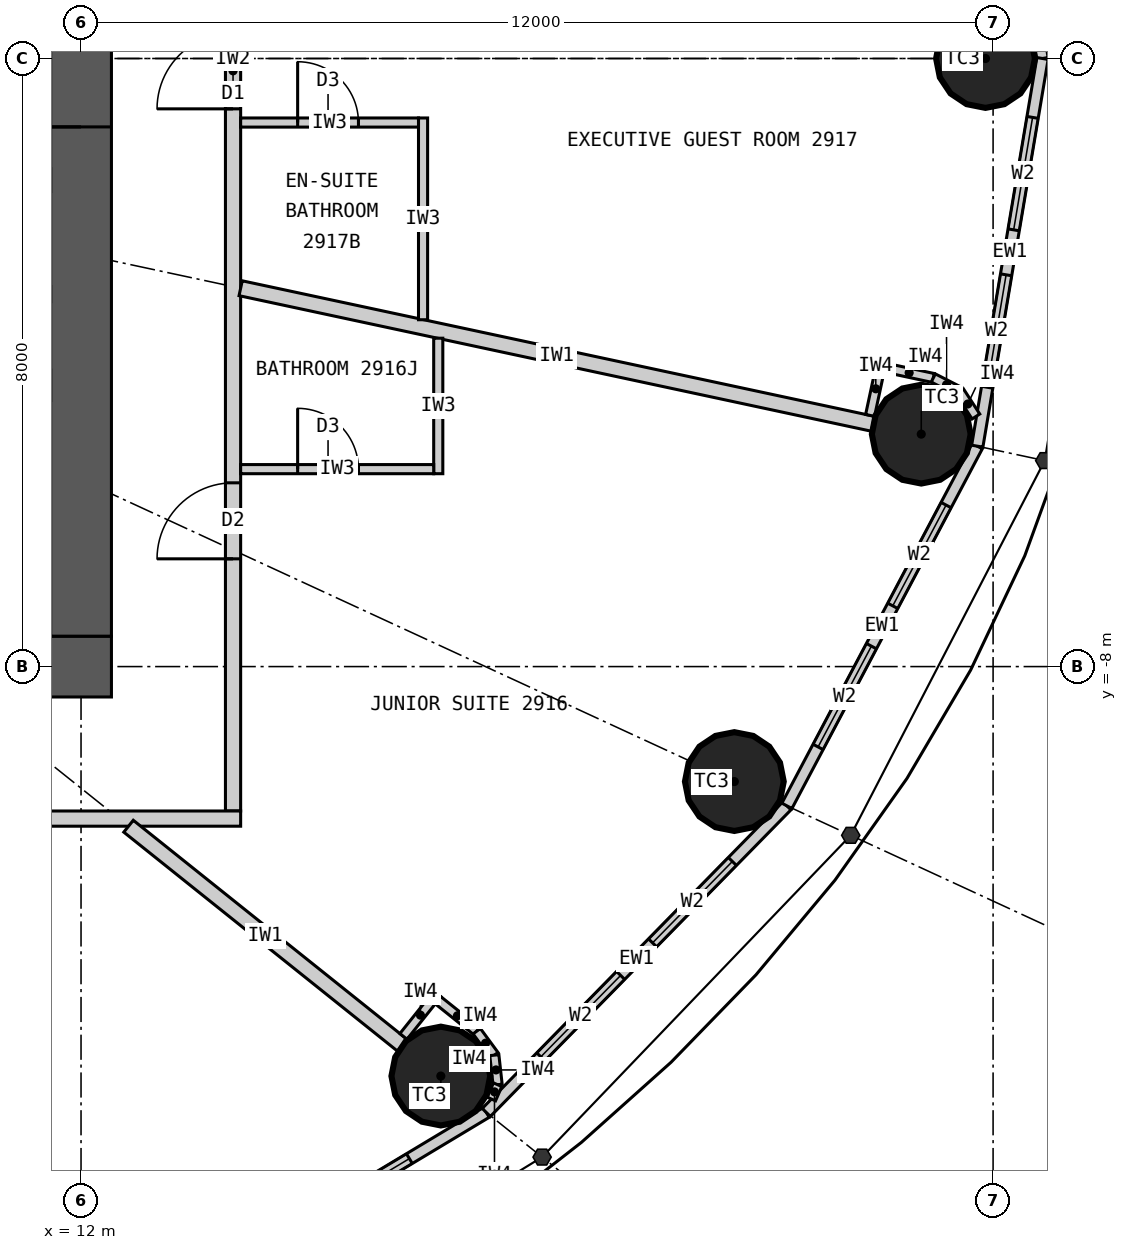
"""IFC4 building model, lengths in metres.
Left out: names, types, materials, properties, quantities, classifications, styles, units other than length and angle.
Written with IfcOpenShell. Run it as: python <this file> out.ifc"""

import sys

from ifc_helpers import new_model, si_unit, direction, frame, frame_2d, origin, origin_2d, place, context, subcontext, project, spatial, rectangle, circle, extrude, element, fill, save


model = new_model("IFC4")
c1 = context("Model", 3, precision=1e-05, world=origin(), true_north=direction((0.0, 1.0)))
c2 = subcontext(c1, "Body", "Model", "MODEL_VIEW")
j1 = project(units=[si_unit("LENGTHUNIT", "METRE"), si_unit("PLANEANGLEUNIT", "RADIAN")], contexts=[c1])
p1 = place(None, origin())
s1 = spatial("IfcSite", under=j1, at=p1, CompositionType="ELEMENT")
p2 = place(p1, origin())
s2 = spatial("IfcBuilding", under=s1, at=p2, CompositionType="ELEMENT")
p3 = place(p2, frame((0.0, 0.0, 115.5)))
s3 = spatial("IfcBuildingStorey", under=s2, at=p3, CompositionType="ELEMENT", Elevation=115.5)
for number, where, z_axis, x_axis in (
    (1, (23.9, 0.0, 0.0), (0.0, 0.0, 1.0), (1.0, 0.0, 0.0)),
    (2, (16.734, -13.387, 0.0), (0.0, 0.0, 1.0), (1.0, 0.0, 0.0)),
    (3, (20.596, -9.513, 0.0), (0.0, 0.0, 1.0), (1.0, 0.0, 0.0)),
    (4, (23.055, -4.942, 0.0), (0.0, 0.0, 1.0), (1.0, 0.0, 0.0)),
):
    element("IfcColumn", number, at=place(p3, frame(where, z_axis=z_axis, x_axis=x_axis)), inside=s3, PredefinedType="COLUMN", context=c2, shape_type="SweptSolid", body=[
        extrude(circle(Radius=0.65, at=origin_2d()), origin(), (0.0, 0.0, 1.0), 3.3),
    ])
p4 = place(p3, frame((12.4, -8.0, 0.0), z_axis=(0.0, 0.0, 1.0), x_axis=(-1.0, 0.0, 0.0)))
e5 = element("IfcWall", 5, at=p4, inside=s3, PredefinedType="SHEAR", context=c2, shape_type="SweptSolid", body=[
    extrude(rectangle(XDim=24.8, YDim=0.8, at=frame_2d((12.4, 0.0))), origin(), (0.0, 0.0, 1.0), 3.3),
])
p5 = place(p4, frame((11.1, 0.0, 0.0)))
e6 = element("IfcOpeningElement", 6, at=p5, cuts=e5, PredefinedType="OPENING", context=c2, shape_type="SweptSolid", body=[
    extrude(rectangle(XDim=1.2, YDim=2.2, at=frame_2d((0.6, 1.1))), frame((0.0, 0.41, 0.0), z_axis=(0.0, -1.0, 0.0), x_axis=(1.0, 0.0, 0.0)), (0.0, 0.0, 1.0), 0.82),
])
p6 = place(p4, frame((18.7, 0.0, 0.0)))
e7 = element("IfcOpeningElement", 7, at=p6, cuts=e5, PredefinedType="OPENING", context=c2, shape_type="SweptSolid", body=[
    extrude(rectangle(XDim=0.9, YDim=2.2, at=frame_2d((0.45, 1.1))), frame((0.0, 0.41, 0.0), z_axis=(0.0, -1.0, 0.0), x_axis=(1.0, 0.0, 0.0)), (0.0, 0.0, 1.0), 0.82),
])
p7 = place(p3, frame((12.0, -7.6, 0.0), z_axis=(0.0, 0.0, 1.0), x_axis=(0.0, 1.0, 0.0)))
e8 = element("IfcWall", 8, at=p7, inside=s3, PredefinedType="SHEAR", context=c2, shape_type="SweptSolid", body=[
    extrude(rectangle(XDim=15.2, YDim=0.8, at=frame_2d((7.6, 0.0))), origin(), (0.0, 0.0, 1.0), 3.3),
])
p8 = place(p7, frame((6.7, 0.0, 0.0)))
e9 = element("IfcOpeningElement", 9, at=p8, cuts=e8, PredefinedType="OPENING", context=c2, shape_type="SweptSolid", body=[
    extrude(rectangle(XDim=1.8, YDim=2.2, at=frame_2d((0.9, 1.1))), frame((0.0, 0.41, 0.0), z_axis=(0.0, -1.0, 0.0), x_axis=(1.0, 0.0, 0.0)), (0.0, 0.0, 1.0), 0.82),
])
p9 = place(p3, frame((24.65, 0.0, 0.0), z_axis=(0.0, 0.0, 1.0), x_axis=(-0.165883894218, 0.986145290329, 0.0)))
e10 = element("IfcWall", 10, at=p9, inside=s3, PredefinedType="ELEMENTEDWALL", context=c2, shape_type="SweptSolid", body=[
    extrude(rectangle(XDim=5.172, YDim=0.15, at=frame_2d((2.586, 0.0))), origin(), (0.0, 0.0, 1.0), 3.12),
])
p10 = place(p9, frame((0.786, 0.0, 0.9)))
e11 = element("IfcOpeningElement", 11, at=p10, cuts=e10, PredefinedType="OPENING", context=c2, shape_type="SweptSolid", body=[
    extrude(rectangle(XDim=1.5, YDim=1.9, at=frame_2d((0.75, 0.95))), frame((0.0, 0.085, 0.0), z_axis=(0.0, -1.0, 0.0), x_axis=(1.0, 0.0, 0.0)), (0.0, 0.0, 1.0), 0.17),
])
p11 = place(p9, frame((2.886, 0.0, 0.9)))
e12 = element("IfcOpeningElement", 12, at=p11, cuts=e10, PredefinedType="OPENING", context=c2, shape_type="SweptSolid", body=[
    extrude(rectangle(XDim=1.5, YDim=1.9, at=frame_2d((0.75, 0.95))), frame((0.0, 0.085, 0.0), z_axis=(0.0, -1.0, 0.0), x_axis=(1.0, 0.0, 0.0)), (0.0, 0.0, 1.0), 0.17),
])
p12 = place(p3, frame((12.221, -16.935, 0.0), z_axis=(0.0, 0.0, 1.0), x_axis=(0.857308573723, 0.514802884044, 0.0)))
e13 = element("IfcWall", 13, at=p12, inside=s3, PredefinedType="ELEMENTEDWALL", context=c2, shape_type="SweptSolid", body=[
    extrude(rectangle(XDim=5.961, YDim=0.15, at=frame_2d((2.98, 0.0))), origin(), (0.0, 0.0, 1.0), 3.12),
])
p13 = place(p12, frame((1.181, 0.0, 0.9)))
e14 = element("IfcOpeningElement", 14, at=p13, cuts=e13, PredefinedType="OPENING", context=c2, shape_type="SweptSolid", body=[
    extrude(rectangle(XDim=1.5, YDim=1.9, at=frame_2d((0.75, 0.95))), frame((0.0, 0.085, 0.0), z_axis=(0.0, -1.0, 0.0), x_axis=(1.0, 0.0, 0.0)), (0.0, 0.0, 1.0), 0.17),
])
p14 = place(p12, frame((3.281, 0.0, 0.9)))
e15 = element("IfcOpeningElement", 15, at=p14, cuts=e13, PredefinedType="OPENING", context=c2, shape_type="SweptSolid", body=[
    extrude(rectangle(XDim=1.5, YDim=1.9, at=frame_2d((0.75, 0.95))), frame((0.0, 0.085, 0.0), z_axis=(0.0, -1.0, 0.0), x_axis=(1.0, 0.0, 0.0)), (0.0, 0.0, 1.0), 0.17),
])
p15 = place(p3, frame((17.332, -13.866, 0.0), z_axis=(0.0, 0.0, 1.0), x_axis=(0.700136650834, 0.714008872605, 0.0)))
e16 = element("IfcWall", 16, at=p15, inside=s3, PredefinedType="ELEMENTEDWALL", context=c2, shape_type="SweptSolid", body=[
    extrude(rectangle(XDim=5.649, YDim=0.15, at=frame_2d((2.825, 0.0))), origin(), (0.0, 0.0, 1.0), 3.12),
])
p16 = place(p15, frame((1.025, 0.0, 0.9)))
e17 = element("IfcOpeningElement", 17, at=p16, cuts=e16, PredefinedType="OPENING", context=c2, shape_type="SweptSolid", body=[
    extrude(rectangle(XDim=1.5, YDim=1.9, at=frame_2d((0.75, 0.95))), frame((0.0, 0.085, 0.0), z_axis=(0.0, -1.0, 0.0), x_axis=(1.0, 0.0, 0.0)), (0.0, 0.0, 1.0), 0.17),
])
p17 = place(p15, frame((3.125, 0.0, 0.9)))
e18 = element("IfcOpeningElement", 18, at=p17, cuts=e16, PredefinedType="OPENING", context=c2, shape_type="SweptSolid", body=[
    extrude(rectangle(XDim=1.5, YDim=1.9, at=frame_2d((0.75, 0.95))), frame((0.0, 0.085, 0.0), z_axis=(0.0, -1.0, 0.0), x_axis=(1.0, 0.0, 0.0)), (0.0, 0.0, 1.0), 0.17),
])
p18 = place(p3, frame((21.287, -9.832, 0.0), z_axis=(0.0, 0.0, 1.0), x_axis=(0.467814388454, 0.883826735257, 0.0)))
e19 = element("IfcWall", 19, at=p18, inside=s3, PredefinedType="ELEMENTEDWALL", context=c2, shape_type="SweptSolid", body=[
    extrude(rectangle(XDim=5.354, YDim=0.15, at=frame_2d((2.677, 0.0))), origin(), (0.0, 0.0, 1.0), 3.12),
])
p19 = place(p18, frame((0.877, 0.0, 0.9)))
e20 = element("IfcOpeningElement", 20, at=p19, cuts=e19, PredefinedType="OPENING", context=c2, shape_type="SweptSolid", body=[
    extrude(rectangle(XDim=1.5, YDim=1.9, at=frame_2d((0.75, 0.95))), frame((0.0, 0.085, 0.0), z_axis=(0.0, -1.0, 0.0), x_axis=(1.0, 0.0, 0.0)), (0.0, 0.0, 1.0), 0.17),
])
p20 = place(p18, frame((2.977, 0.0, 0.9)))
e21 = element("IfcOpeningElement", 21, at=p20, cuts=e19, PredefinedType="OPENING", context=c2, shape_type="SweptSolid", body=[
    extrude(rectangle(XDim=1.5, YDim=1.9, at=frame_2d((0.75, 0.95))), frame((0.0, 0.085, 0.0), z_axis=(0.0, -1.0, 0.0), x_axis=(1.0, 0.0, 0.0)), (0.0, 0.0, 1.0), 0.17),
])
p21 = place(p3, frame((23.792, -5.1, 0.0), z_axis=(0.0, 0.0, 1.0), x_axis=(0.165883894218, 0.986145290329, 0.0)))
e22 = element("IfcWall", 22, at=p21, inside=s3, PredefinedType="ELEMENTEDWALL", context=c2, shape_type="SweptSolid", body=[
    extrude(rectangle(XDim=5.172, YDim=0.15, at=frame_2d((2.586, 0.0))), origin(), (0.0, 0.0, 1.0), 3.12),
])
p22 = place(p21, frame((0.786, 0.0, 0.9)))
e23 = element("IfcOpeningElement", 23, at=p22, cuts=e22, PredefinedType="OPENING", context=c2, shape_type="SweptSolid", body=[
    extrude(rectangle(XDim=1.5, YDim=1.9, at=frame_2d((0.75, 0.95))), frame((0.0, 0.085, 0.0), z_axis=(0.0, -1.0, 0.0), x_axis=(1.0, 0.0, 0.0)), (0.0, 0.0, 1.0), 0.17),
])
p23 = place(p21, frame((2.886, 0.0, 0.9)))
e24 = element("IfcOpeningElement", 24, at=p23, cuts=e22, PredefinedType="OPENING", context=c2, shape_type="SweptSolid", body=[
    extrude(rectangle(XDim=1.5, YDim=1.9, at=frame_2d((0.75, 0.95))), frame((0.0, 0.085, 0.0), z_axis=(0.0, -1.0, 0.0), x_axis=(1.0, 0.0, 0.0)), (0.0, 0.0, 1.0), 0.17),
])
p24 = place(p3, frame((14.0, -9.9, 0.0), z_axis=(0.0, 0.0, 1.0), x_axis=(0.0, 1.0, 0.0)))
e25 = element("IfcWall", 25, at=p24, inside=s3, PredefinedType="PARTITIONING", context=c2, shape_type="SweptSolid", body=[
    extrude(rectangle(XDim=19.8, YDim=0.2, at=frame_2d((9.9, 0.0))), origin(), (0.0, 0.0, 1.0), 3.12),
])
p25 = place(p24, frame((3.318, 0.0, 0.0)))
e26 = element("IfcOpeningElement", 26, at=p25, cuts=e25, PredefinedType="OPENING", context=c2, shape_type="SweptSolid", body=[
    extrude(rectangle(XDim=1.0, YDim=2.2, at=frame_2d((0.5, 1.1))), frame((0.0, 0.11, 0.0), z_axis=(0.0, -1.0, 0.0), x_axis=(1.0, 0.0, 0.0)), (0.0, 0.0, 1.0), 0.22),
])
p26 = place(p24, frame((9.238, 0.0, 0.0)))
e27 = element("IfcOpeningElement", 27, at=p26, cuts=e25, PredefinedType="OPENING", context=c2, shape_type="SweptSolid", body=[
    extrude(rectangle(XDim=1.0, YDim=2.2, at=frame_2d((0.5, 1.1))), frame((0.0, 0.11, 0.0), z_axis=(0.0, -1.0, 0.0), x_axis=(1.0, 0.0, 0.0)), (0.0, 0.0, 1.0), 0.22),
])
p27 = place(p24, frame((13.742, 0.0, 0.0)))
e28 = element("IfcOpeningElement", 28, at=p27, cuts=e25, PredefinedType="OPENING", context=c2, shape_type="SweptSolid", body=[
    extrude(rectangle(XDim=1.0, YDim=2.2, at=frame_2d((0.5, 1.1))), frame((0.0, 0.11, 0.0), z_axis=(0.0, -1.0, 0.0), x_axis=(1.0, 0.0, 0.0)), (0.0, 0.0, 1.0), 0.22),
])
p28 = place(p24, frame((18.698, 0.0, 0.0)))
e29 = element("IfcOpeningElement", 29, at=p28, cuts=e25, PredefinedType="OPENING", context=c2, shape_type="SweptSolid", body=[
    extrude(rectangle(XDim=1.0, YDim=2.2, at=frame_2d((0.5, 1.1))), frame((0.0, 0.11, 0.0), z_axis=(0.0, -1.0, 0.0), x_axis=(1.0, 0.0, 0.0)), (0.0, 0.0, 1.0), 0.22),
])
p29 = place(p3, frame((14.1, -10.0, 0.0), z_axis=(0.0, 0.0, 1.0), x_axis=(-1.0, 0.0, 0.0)))
e30 = element("IfcWall", 30, at=p29, inside=s3, PredefinedType="PARTITIONING", context=c2, shape_type="SweptSolid", body=[
    extrude(rectangle(XDim=10.817, YDim=0.2, at=frame_2d((5.409, 0.0))), origin(), (0.0, 0.0, 1.0), 3.12),
])
p30 = place(p3, frame((12.625, -10.1, 0.0), z_axis=(0.0, 0.0, 1.0), x_axis=(0.780863644897, -0.624701503182, 0.0)))
e31 = element("IfcWall", 31, at=p30, inside=s3, PredefinedType="PARTITIONING", context=c2, shape_type="SweptSolid", body=[
    extrude(rectangle(XDim=4.612, YDim=0.2, at=frame_2d((2.306, 0.0))), origin(), (0.0, 0.0, 1.0), 2.37),
])
p31 = place(p3, frame((14.1, -3.022, 0.0), z_axis=(0.0, 0.0, 1.0), x_axis=(0.977783513367, -0.209617272638, 0.0)))
e32 = element("IfcWall", 32, at=p31, inside=s3, PredefinedType="PARTITIONING", context=c2, shape_type="SweptSolid", body=[
    extrude(rectangle(XDim=8.508, YDim=0.2, at=frame_2d((4.254, 0.0))), origin(), (0.0, 0.0, 1.0), 2.37),
])
p32 = place(p3, frame((16.7, -3.68, 0.0), z_axis=(0.0, 0.0, 1.0), x_axis=(0.0, -1.0, 0.0)))
e33 = element("IfcWall", 33, at=p32, inside=s3, PredefinedType="PARTITIONING", context=c2, shape_type="SweptSolid", body=[
    extrude(rectangle(XDim=1.783, YDim=0.12, at=frame_2d((0.891, 0.0))), origin(), (0.0, 0.0, 1.0), 3.12),
])
p33 = place(p3, frame((14.1, -5.403, 0.0), z_axis=(0.0, 0.0, 1.0), x_axis=(1.0, 0.0, 0.0)))
e34 = element("IfcWall", 34, at=p33, inside=s3, PredefinedType="PARTITIONING", context=c2, shape_type="SweptSolid", body=[
    extrude(rectangle(XDim=2.54, YDim=0.12, at=frame_2d((1.27, 0.0))), origin(), (0.0, 0.0, 1.0), 3.12),
])
p34 = place(p33, frame((0.75, 0.0, 0.0)))
e35 = element("IfcOpeningElement", 35, at=p34, cuts=e34, PredefinedType="OPENING", context=c2, shape_type="SweptSolid", body=[
    extrude(rectangle(XDim=0.8, YDim=2.1, at=frame_2d((0.4, 1.05))), frame((0.0, 0.07, 0.0), z_axis=(0.0, -1.0, 0.0), x_axis=(1.0, 0.0, 0.0)), (0.0, 0.0, 1.0), 0.14),
])
p35 = place(p3, frame((16.5, -3.437, 0.0), z_axis=(0.0, 0.0, 1.0), x_axis=(0.0, 1.0, 0.0)))
e36 = element("IfcWall", 36, at=p35, inside=s3, PredefinedType="PARTITIONING", context=c2, shape_type="SweptSolid", body=[
    extrude(rectangle(XDim=2.655, YDim=0.12, at=frame_2d((1.327, 0.0))), origin(), (0.0, 0.0, 1.0), 3.12),
])
p36 = place(p3, frame((14.1, -0.843, 0.0), z_axis=(0.0, 0.0, 1.0), x_axis=(1.0, 0.0, 0.0)))
e37 = element("IfcWall", 37, at=p36, inside=s3, PredefinedType="PARTITIONING", context=c2, shape_type="SweptSolid", body=[
    extrude(rectangle(XDim=2.34, YDim=0.12, at=frame_2d((1.17, 0.0))), origin(), (0.0, 0.0, 1.0), 3.12),
])
p37 = place(p36, frame((0.75, 0.0, 0.0)))
e38 = element("IfcOpeningElement", 38, at=p37, cuts=e37, PredefinedType="OPENING", context=c2, shape_type="SweptSolid", body=[
    extrude(rectangle(XDim=0.8, YDim=2.1, at=frame_2d((0.4, 1.05))), frame((0.0, 0.07, 0.0), z_axis=(0.0, -1.0, 0.0), x_axis=(1.0, 0.0, 0.0)), (0.0, 0.0, 1.0), 0.14),
])
p38 = place(p3, frame((16.242, -12.865, 0.0), z_axis=(0.0, 0.0, 1.0), x_axis=(0.624861414622, 0.780735686719, 0.0)))
e39 = element("IfcWall", 39, at=p38, inside=s3, PredefinedType="PARTITIONING", context=c2, shape_type="SweptSolid", body=[
    extrude(rectangle(XDim=0.716, YDim=0.12, at=frame_2d((0.358, 0.0))), origin(), (0.0, 0.0, 1.0), 3.12),
])
p39 = place(p3, frame((16.698, -12.391, 0.0), z_axis=(0.0, 0.0, 1.0), x_axis=(0.780722240533, -0.624878214645, 0.0)))
e40 = element("IfcWall", 40, at=p39, inside=s3, PredefinedType="PARTITIONING", context=c2, shape_type="SweptSolid", body=[
    extrude(rectangle(XDim=0.65, YDim=0.12, at=frame_2d((0.325, 0.0))), origin(), (0.0, 0.0, 1.0), 3.12),
])
p40 = place(p3, frame((17.206, -12.797, 0.0), z_axis=(0.0, 0.0, 1.0), x_axis=(0.592986095904, -0.805212698648, 0.0)))
e41 = element("IfcWall", 41, at=p40, inside=s3, PredefinedType="PARTITIONING", context=c2, shape_type="SweptSolid", body=[
    extrude(rectangle(XDim=0.391, YDim=0.12, at=frame_2d((0.196, 0.0))), origin(), (0.0, 0.0, 1.0), 3.12),
])
p41 = place(p3, frame((17.438, -13.112, 0.0), z_axis=(0.0, 0.0, 1.0), x_axis=(0.109815164188, -0.993952025862, 0.0)))
e42 = element("IfcWall", 42, at=p41, inside=s3, PredefinedType="PARTITIONING", context=c2, shape_type="SweptSolid", body=[
    extrude(rectangle(XDim=0.391, YDim=0.12, at=frame_2d((0.196, 0.0))), origin(), (0.0, 0.0, 1.0), 3.12),
])
p42 = place(p3, frame((17.481, -13.501, 0.0), z_axis=(0.0, 0.0, 1.0), x_axis=(-0.401504188288, -0.915857186895, 0.0)))
e43 = element("IfcWall", 43, at=p42, inside=s3, PredefinedType="PARTITIONING", context=c2, shape_type="SweptSolid", body=[
    extrude(rectangle(XDim=0.206, YDim=0.12, at=frame_2d((0.103, 0.0))), origin(), (0.0, 0.0, 1.0), 3.12),
])
p43 = place(p3, frame((22.382, -4.695, 0.0), z_axis=(0.0, 0.0, 1.0), x_axis=(0.209808658628, 0.977742464438, 0.0)))
e44 = element("IfcWall", 44, at=p43, inside=s3, PredefinedType="PARTITIONING", context=c2, shape_type="SweptSolid", body=[
    extrude(rectangle(XDim=0.716, YDim=0.12, at=frame_2d((0.358, 0.0))), origin(), (0.0, 0.0, 1.0), 3.12),
])
p44 = place(p3, frame((22.578, -4.067, 0.0), z_axis=(0.0, 0.0, 1.0), x_axis=(0.977802414077, -0.209529088731, 0.0)))
e45 = element("IfcWall", 45, at=p44, inside=s3, PredefinedType="PARTITIONING", context=c2, shape_type="SweptSolid", body=[
    extrude(rectangle(XDim=0.65, YDim=0.12, at=frame_2d((0.325, 0.0))), origin(), (0.0, 0.0, 1.0), 3.12),
])
for number, where, z_axis, x_axis in (
    (46, (23.213, -4.203, 0.0), (0.0, 0.0, 1.0), (0.89, -0.456, 0.0)),
    (47, (23.562, -4.381, 0.0), (0.0, 0.0, 1.0), (0.543, -0.84, 0.0)),
):
    element("IfcWall", number, at=place(p3, frame(where, z_axis=z_axis, x_axis=x_axis)), inside=s3, PredefinedType="PARTITIONING", context=c2, shape_type="SweptSolid", body=[
        extrude(rectangle(XDim=0.391, YDim=0.12, at=frame_2d((0.196, 0.0))), origin(), (0.0, 0.0, 1.0), 3.12),
    ])
p45 = place(p14, origin())
e48 = element("IfcWindow", 48, at=p45, inside=s3, PartitioningType="SINGLE_PANEL", PredefinedType="WINDOW", context=c2, shape_type="SweptSolid", body=[
    extrude(rectangle(XDim=1.5, YDim=1.9, at=frame_2d((0.75, 0.95))), frame((0.0, 0.03, 0.0), z_axis=(0.0, -1.0, 0.0), x_axis=(1.0, 0.0, 0.0)), (0.0, 0.0, 1.0), 0.06),
])
fill(e15, e48)
p46 = place(p16, origin())
e49 = element("IfcWindow", 49, at=p46, inside=s3, PartitioningType="SINGLE_PANEL", PredefinedType="WINDOW", context=c2, shape_type="SweptSolid", body=[
    extrude(rectangle(XDim=1.5, YDim=1.9, at=frame_2d((0.75, 0.95))), frame((0.0, 0.03, 0.0), z_axis=(0.0, -1.0, 0.0), x_axis=(1.0, 0.0, 0.0)), (0.0, 0.0, 1.0), 0.06),
])
fill(e17, e49)
p47 = place(p17, origin())
e50 = element("IfcWindow", 50, at=p47, inside=s3, PartitioningType="SINGLE_PANEL", PredefinedType="WINDOW", context=c2, shape_type="SweptSolid", body=[
    extrude(rectangle(XDim=1.5, YDim=1.9, at=frame_2d((0.75, 0.95))), frame((0.0, 0.03, 0.0), z_axis=(0.0, -1.0, 0.0), x_axis=(1.0, 0.0, 0.0)), (0.0, 0.0, 1.0), 0.06),
])
fill(e18, e50)
p48 = place(p19, origin())
e51 = element("IfcWindow", 51, at=p48, inside=s3, PartitioningType="SINGLE_PANEL", PredefinedType="WINDOW", context=c2, shape_type="SweptSolid", body=[
    extrude(rectangle(XDim=1.5, YDim=1.9, at=frame_2d((0.75, 0.95))), frame((0.0, 0.03, 0.0), z_axis=(0.0, -1.0, 0.0), x_axis=(1.0, 0.0, 0.0)), (0.0, 0.0, 1.0), 0.06),
])
fill(e20, e51)
p49 = place(p20, origin())
e52 = element("IfcWindow", 52, at=p49, inside=s3, PartitioningType="SINGLE_PANEL", PredefinedType="WINDOW", context=c2, shape_type="SweptSolid", body=[
    extrude(rectangle(XDim=1.5, YDim=1.9, at=frame_2d((0.75, 0.95))), frame((0.0, 0.03, 0.0), z_axis=(0.0, -1.0, 0.0), x_axis=(1.0, 0.0, 0.0)), (0.0, 0.0, 1.0), 0.06),
])
fill(e21, e52)
p50 = place(p22, origin())
e53 = element("IfcWindow", 53, at=p50, inside=s3, PartitioningType="SINGLE_PANEL", PredefinedType="WINDOW", context=c2, shape_type="SweptSolid", body=[
    extrude(rectangle(XDim=1.5, YDim=1.9, at=frame_2d((0.75, 0.95))), frame((0.0, 0.03, 0.0), z_axis=(0.0, -1.0, 0.0), x_axis=(1.0, 0.0, 0.0)), (0.0, 0.0, 1.0), 0.06),
])
fill(e23, e53)
p51 = place(p23, origin())
e54 = element("IfcWindow", 54, at=p51, inside=s3, PartitioningType="SINGLE_PANEL", PredefinedType="WINDOW", context=c2, shape_type="SweptSolid", body=[
    extrude(rectangle(XDim=1.5, YDim=1.9, at=frame_2d((0.75, 0.95))), frame((0.0, 0.03, 0.0), z_axis=(0.0, -1.0, 0.0), x_axis=(1.0, 0.0, 0.0)), (0.0, 0.0, 1.0), 0.06),
])
fill(e24, e54)
p52 = place(p34, origin())
e55 = element("IfcDoor", 55, at=p52, inside=s3, OperationType="SINGLE_SWING_LEFT", PredefinedType="DOOR", context=c2, shape_type="SweptSolid", body=[
    extrude(rectangle(XDim=0.8, YDim=2.1, at=frame_2d((0.4, 1.05))), frame((0.0, 0.025, 0.0), z_axis=(0.0, -1.0, 0.0), x_axis=(1.0, 0.0, 0.0)), (0.0, 0.0, 1.0), 0.05),
])
fill(e35, e55)
p53 = place(p25, origin())
e56 = element("IfcDoor", 56, at=p53, inside=s3, OperationType="SINGLE_SWING_LEFT", PredefinedType="DOOR", context=c2, shape_type="SweptSolid", body=[
    extrude(rectangle(XDim=1.0, YDim=2.2, at=frame_2d((0.5, 1.1))), frame((0.0, 0.025, 0.0), z_axis=(0.0, -1.0, 0.0), x_axis=(1.0, 0.0, 0.0)), (0.0, 0.0, 1.0), 0.05),
])
fill(e26, e56)
p54 = place(p37, origin())
e57 = element("IfcDoor", 57, at=p54, inside=s3, OperationType="SINGLE_SWING_LEFT", PredefinedType="DOOR", context=c2, shape_type="SweptSolid", body=[
    extrude(rectangle(XDim=0.8, YDim=2.1, at=frame_2d((0.4, 1.05))), frame((0.0, 0.025, 0.0), z_axis=(0.0, -1.0, 0.0), x_axis=(1.0, 0.0, 0.0)), (0.0, 0.0, 1.0), 0.05),
])
fill(e38, e57)
p55 = place(p26, origin())
e58 = element("IfcDoor", 58, at=p55, inside=s3, OperationType="SINGLE_SWING_LEFT", PredefinedType="DOOR", context=c2, shape_type="SweptSolid", body=[
    extrude(rectangle(XDim=1.0, YDim=2.2, at=frame_2d((0.5, 1.1))), frame((0.0, 0.025, 0.0), z_axis=(0.0, -1.0, 0.0), x_axis=(1.0, 0.0, 0.0)), (0.0, 0.0, 1.0), 0.05),
])
fill(e27, e58)
p56 = place(p8, origin())
e59 = element("IfcDoor", 59, at=p56, inside=s3, OperationType="DOUBLE_DOOR_DOUBLE_SWING", PredefinedType="DOOR", context=c2, shape_type="SweptSolid", body=[
    extrude(rectangle(XDim=1.8, YDim=2.2, at=frame_2d((0.9, 1.1))), frame((0.0, 0.025, 0.0), z_axis=(0.0, -1.0, 0.0), x_axis=(1.0, 0.0, 0.0)), (0.0, 0.0, 1.0), 0.05),
])
fill(e9, e59)
save(model, sys.argv[1])
